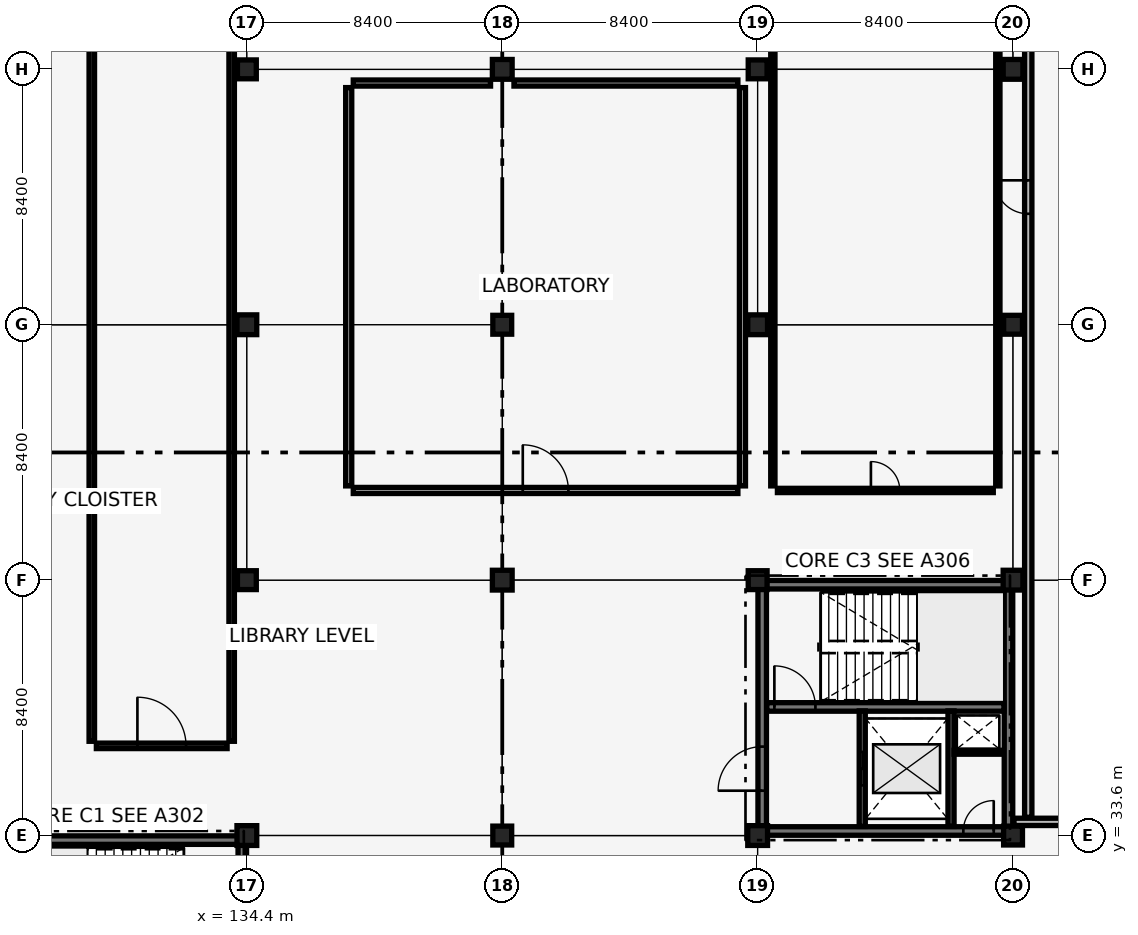
"""IFC4 building model, lengths in metres.
Left out: names, types, materials, properties, quantities, classifications, styles, units other than length and angle.
Written with IfcOpenShell. Run it as: python <this file> out.ifc"""

import sys

from ifc_helpers import new_model, si_unit, direction, frame, frame_2d, origin, origin_2d, place, context, subcontext, project, spatial, rectangle, extrude, element, fill, save


model = new_model("IFC4")
c1 = context("Model", 3, precision=1e-05, world=origin(), true_north=direction((0.0, 1.0)))
c2 = subcontext(c1, "Body", "Model", "MODEL_VIEW")
j1 = project(units=[si_unit("LENGTHUNIT", "METRE"), si_unit("PLANEANGLEUNIT", "RADIAN")], contexts=[c1])
p1 = place(None, origin())
s1 = spatial("IfcSite", under=j1, at=p1, CompositionType="ELEMENT")
p2 = place(p1, origin())
s2 = spatial("IfcBuilding", under=s1, at=p2, CompositionType="ELEMENT")
p3 = place(p2, frame((0.0, 0.0, 13.94)))
s3 = spatial("IfcBuildingStorey", under=s2, at=p3, CompositionType="ELEMENT", Elevation=13.94)
p4 = place(p3, frame((126.15, 33.45, 0.0), z_axis=(0.0, 0.0, 1.0), x_axis=(1.0, 0.0, 0.0)))
e1 = element("IfcWall", 1, at=p4, inside=s3, PredefinedType="SHEAR", context=c2, shape_type="SweptSolid", body=[
    extrude(rectangle(XDim=8.1, YDim=0.28, at=frame_2d((4.05, 0.0))), origin(), (0.0, 0.0, 1.0), 3.78),
])
p5 = place(p3, frame((134.25, 25.35, 0.0), z_axis=(0.0, 0.0, 1.0), x_axis=(0.0, 1.0, 0.0)))
e2 = element("IfcWall", 2, at=p5, inside=s3, PredefinedType="SHEAR", context=c2, shape_type="SweptSolid", body=[
    extrude(rectangle(XDim=8.1, YDim=0.28, at=frame_2d((4.05, 0.0))), origin(), (0.0, 0.0, 1.0), 3.78),
])
p6 = place(p5, frame((1.325, 0.0, 0.0)))
e3 = element("IfcOpeningElement", 3, at=p6, cuts=e2, PredefinedType="OPENING", context=c2, shape_type="SweptSolid", body=[
    extrude(rectangle(XDim=1.45, YDim=2.15, at=frame_2d((0.725, 1.075))), frame((0.0, 0.15, 0.0), z_axis=(0.0, -1.0, 0.0), x_axis=(1.0, 0.0, 0.0)), (0.0, 0.0, 1.0), 0.3),
])
p7 = place(p3, frame((151.35, 33.75, 0.0), z_axis=(0.0, 0.0, 1.0), x_axis=(1.0, 0.0, 0.0)))
e4 = element("IfcWall", 4, at=p7, inside=s3, PredefinedType="SHEAR", context=c2, shape_type="SweptSolid", body=[
    extrude(rectangle(XDim=8.1, YDim=0.28, at=frame_2d((4.05, 0.0))), origin(), (0.0, 0.0, 1.0), 3.78),
])
p8 = place(p7, frame((6.615, 0.0, 0.0)))
e5 = element("IfcOpeningElement", 5, at=p8, cuts=e4, PredefinedType="OPENING", context=c2, shape_type="SweptSolid", body=[
    extrude(rectangle(XDim=1.0, YDim=2.15, at=frame_2d((0.5, 1.075))), frame((0.0, 0.15, 0.0), z_axis=(0.0, -1.0, 0.0), x_axis=(1.0, 0.0, 0.0)), (0.0, 0.0, 1.0), 0.3),
])
p9 = place(p3, frame((151.35, 41.85, 0.0), z_axis=(0.0, 0.0, 1.0), x_axis=(1.0, 0.0, 0.0)))
e6 = element("IfcWall", 6, at=p9, inside=s3, PredefinedType="SHEAR", context=c2, shape_type="SweptSolid", body=[
    extrude(rectangle(XDim=8.1, YDim=0.28, at=frame_2d((4.05, 0.0))), origin(), (0.0, 0.0, 1.0), 3.78),
])
p10 = place(p3, frame((151.35, 33.75, 0.0), z_axis=(0.0, 0.0, 1.0), x_axis=(0.0, 1.0, 0.0)))
e7 = element("IfcWall", 7, at=p10, inside=s3, PredefinedType="SHEAR", context=c2, shape_type="SweptSolid", body=[
    extrude(rectangle(XDim=8.1, YDim=0.28, at=frame_2d((4.05, 0.0))), origin(), (0.0, 0.0, 1.0), 3.78),
])
p11 = place(p10, frame((1.325, 0.0, 0.0)))
e8 = element("IfcOpeningElement", 8, at=p11, cuts=e7, PredefinedType="OPENING", context=c2, shape_type="SweptSolid", body=[
    extrude(rectangle(XDim=1.45, YDim=2.15, at=frame_2d((0.725, 1.075))), frame((0.0, 0.15, 0.0), z_axis=(0.0, -1.0, 0.0), x_axis=(1.0, 0.0, 0.0)), (0.0, 0.0, 1.0), 0.3),
])
p12 = place(p3, frame((159.45, 33.75, 0.0), z_axis=(0.0, 0.0, 1.0), x_axis=(0.0, 1.0, 0.0)))
e9 = element("IfcWall", 9, at=p12, inside=s3, PredefinedType="SHEAR", context=c2, shape_type="SweptSolid", body=[
    extrude(rectangle(XDim=8.1, YDim=0.28, at=frame_2d((4.05, 0.0))), origin(), (0.0, 0.0, 1.0), 3.78),
])
p13 = place(p3, frame((151.5, 37.83, 0.0), z_axis=(0.0, 0.0, 1.0), x_axis=(1.0, 0.0, 0.0)))
e10 = element("IfcWall", 10, at=p13, inside=s3, PredefinedType="SHEAR", context=c2, shape_type="SweptSolid", body=[
    extrude(rectangle(XDim=7.8, YDim=0.28, at=frame_2d((3.9, 0.0))), origin(), (0.0, 0.0, 1.0), 3.78),
])
p14 = place(p13, frame((0.25, 0.0, 0.0)))
e11 = element("IfcOpeningElement", 11, at=p14, cuts=e10, PredefinedType="OPENING", context=c2, shape_type="SweptSolid", body=[
    extrude(rectangle(XDim=1.35, YDim=2.15, at=frame_2d((0.675, 1.075))), frame((0.0, 0.15, 0.0), z_axis=(0.0, -1.0, 0.0), x_axis=(1.0, 0.0, 0.0)), (0.0, 0.0, 1.0), 0.3),
])
p15 = place(p3, frame((134.4, 33.6, 0.0), z_axis=(0.0, 0.0, 1.0), x_axis=(1.0, 0.0, 0.0)))
e12 = element("IfcColumn", 12, at=p15, inside=s3, PredefinedType="COLUMN", context=c2, shape_type="SweptSolid", body=[
    extrude(rectangle(XDim=0.65, YDim=0.65, at=origin_2d()), origin(), (0.0, 0.0, 1.0), 3.78),
])
p16 = place(p3, frame((134.4, 42.0, 0.0), z_axis=(0.0, 0.0, 1.0), x_axis=(1.0, 0.0, 0.0)))
e13 = element("IfcColumn", 13, at=p16, inside=s3, PredefinedType="COLUMN", context=c2, shape_type="SweptSolid", body=[
    extrude(rectangle(XDim=0.62, YDim=0.62, at=origin_2d()), origin(), (0.0, 0.0, 1.0), 3.78),
])
p17 = place(p3, frame((134.4, 50.4, 0.0), z_axis=(0.0, 0.0, 1.0), x_axis=(1.0, 0.0, 0.0)))
e14 = element("IfcColumn", 14, at=p17, inside=s3, PredefinedType="COLUMN", context=c2, shape_type="SweptSolid", body=[
    extrude(rectangle(XDim=0.65, YDim=0.65, at=origin_2d()), origin(), (0.0, 0.0, 1.0), 3.78),
])
for number, where, z_axis, x_axis in (
    (15, (134.4, 58.8, 0.0), (0.0, 0.0, 1.0), (1.0, 0.0, 0.0)),
    (16, (142.8, 33.6, 0.0), (0.0, 0.0, 1.0), (1.0, 0.0, 0.0)),
):
    element("IfcColumn", number, at=place(p3, frame(where, z_axis=z_axis, x_axis=x_axis)), inside=s3, PredefinedType="COLUMN", context=c2, shape_type="SweptSolid", body=[
        extrude(rectangle(XDim=0.62, YDim=0.62, at=origin_2d()), origin(), (0.0, 0.0, 1.0), 3.78),
    ])
p18 = place(p3, frame((142.8, 42.0, 0.0), z_axis=(0.0, 0.0, 1.0), x_axis=(1.0, 0.0, 0.0)))
e17 = element("IfcColumn", 17, at=p18, inside=s3, PredefinedType="COLUMN", context=c2, shape_type="SweptSolid", body=[
    extrude(rectangle(XDim=0.65, YDim=0.65, at=origin_2d()), origin(), (0.0, 0.0, 1.0), 3.78),
])
p19 = place(p3, frame((142.8, 50.4, 0.0), z_axis=(0.0, 0.0, 1.0), x_axis=(1.0, 0.0, 0.0)))
e18 = element("IfcColumn", 18, at=p19, inside=s3, PredefinedType="COLUMN", context=c2, shape_type="SweptSolid", body=[
    extrude(rectangle(XDim=0.62, YDim=0.62, at=origin_2d()), origin(), (0.0, 0.0, 1.0), 3.78),
])
for number, where, z_axis, x_axis in (
    (19, (142.8, 58.8, 0.0), (0.0, 0.0, 1.0), (1.0, 0.0, 0.0)),
    (20, (151.2, 33.6, 0.0), (0.0, 0.0, 1.0), (1.0, 0.0, 0.0)),
):
    element("IfcColumn", number, at=place(p3, frame(where, z_axis=z_axis, x_axis=x_axis)), inside=s3, PredefinedType="COLUMN", context=c2, shape_type="SweptSolid", body=[
        extrude(rectangle(XDim=0.65, YDim=0.65, at=origin_2d()), origin(), (0.0, 0.0, 1.0), 3.78),
    ])
p20 = place(p3, frame((151.2, 42.0, 0.0), z_axis=(0.0, 0.0, 1.0), x_axis=(1.0, 0.0, 0.0)))
e21 = element("IfcColumn", 21, at=p20, inside=s3, PredefinedType="COLUMN", context=c2, shape_type="SweptSolid", body=[
    extrude(rectangle(XDim=0.62, YDim=0.62, at=origin_2d()), origin(), (0.0, 0.0, 1.0), 3.78),
])
p21 = place(p3, frame((151.2, 50.4, 0.0), z_axis=(0.0, 0.0, 1.0), x_axis=(1.0, 0.0, 0.0)))
e22 = element("IfcColumn", 22, at=p21, inside=s3, PredefinedType="COLUMN", context=c2, shape_type="SweptSolid", body=[
    extrude(rectangle(XDim=0.65, YDim=0.65, at=origin_2d()), origin(), (0.0, 0.0, 1.0), 3.78),
])
for number, where, z_axis, x_axis in (
    (23, (151.2, 58.8, 0.0), (0.0, 0.0, 1.0), (1.0, 0.0, 0.0)),
    (24, (159.6, 33.6, 0.0), (0.0, 0.0, 1.0), (1.0, 0.0, 0.0)),
):
    element("IfcColumn", number, at=place(p3, frame(where, z_axis=z_axis, x_axis=x_axis)), inside=s3, PredefinedType="COLUMN", context=c2, shape_type="SweptSolid", body=[
        extrude(rectangle(XDim=0.62, YDim=0.62, at=origin_2d()), origin(), (0.0, 0.0, 1.0), 3.78),
    ])
p22 = place(p3, frame((159.6, 42.0, 0.0), z_axis=(0.0, 0.0, 1.0), x_axis=(1.0, 0.0, 0.0)))
e25 = element("IfcColumn", 25, at=p22, inside=s3, PredefinedType="COLUMN", context=c2, shape_type="SweptSolid", body=[
    extrude(rectangle(XDim=0.65, YDim=0.65, at=origin_2d()), origin(), (0.0, 0.0, 1.0), 3.78),
])
p23 = place(p3, frame((159.6, 50.4, 0.0), z_axis=(0.0, 0.0, 1.0), x_axis=(1.0, 0.0, 0.0)))
e26 = element("IfcColumn", 26, at=p23, inside=s3, PredefinedType="COLUMN", context=c2, shape_type="SweptSolid", body=[
    extrude(rectangle(XDim=0.62, YDim=0.62, at=origin_2d()), origin(), (0.0, 0.0, 1.0), 3.78),
])
p24 = place(p3, frame((159.6, 58.8, 0.0), z_axis=(0.0, 0.0, 1.0), x_axis=(1.0, 0.0, 0.0)))
e27 = element("IfcColumn", 27, at=p24, inside=s3, PredefinedType="COLUMN", context=c2, shape_type="SweptSolid", body=[
    extrude(rectangle(XDim=0.65, YDim=0.65, at=origin_2d()), origin(), (0.0, 0.0, 1.0), 3.78),
])
p25 = place(p3, frame((154.64, 33.9, 0.0), z_axis=(0.0, 0.0, 1.0), x_axis=(0.0, 1.0, 0.0)))
e28 = element("IfcWall", 28, at=p25, inside=s3, PredefinedType="SHEAR", context=c2, shape_type="SweptSolid", body=[
    extrude(rectangle(XDim=3.8, YDim=0.2, at=frame_2d((1.9, 0.0))), origin(), (0.0, 0.0, 1.0), 3.05),
])
p26 = place(p25, frame((1.35, 0.0, 0.0)))
e29 = element("IfcOpeningElement", 29, at=p26, cuts=e28, PredefinedType="OPENING", context=c2, shape_type="SweptSolid", body=[
    extrude(rectangle(XDim=1.1, YDim=2.15, at=frame_2d((0.55, 1.075))), frame((0.0, 0.11, 0.0), z_axis=(0.0, -1.0, 0.0), x_axis=(1.0, 0.0, 0.0)), (0.0, 0.0, 1.0), 0.22),
])
p27 = place(p3, frame((157.56, 33.9, 0.0), z_axis=(0.0, 0.0, 1.0), x_axis=(0.0, 1.0, 0.0)))
e30 = element("IfcWall", 30, at=p27, inside=s3, PredefinedType="SHEAR", context=c2, shape_type="SweptSolid", body=[
    extrude(rectangle(XDim=3.8, YDim=0.2, at=frame_2d((1.9, 0.0))), origin(), (0.0, 0.0, 1.0), 3.05),
])
p28 = place(p3, frame((157.66, 36.34, 0.0), z_axis=(0.0, 0.0, 1.0), x_axis=(1.0, 0.0, 0.0)))
e31 = element("IfcWall", 31, at=p28, inside=s3, PredefinedType="PARTITIONING", context=c2, shape_type="SweptSolid", body=[
    extrude(rectangle(XDim=1.62, YDim=0.13, at=frame_2d((0.81, 0.0))), origin(), (0.0, 0.0, 1.0), 3.78),
])
p29 = place(p3, frame((160.1, 34.2, 0.0), z_axis=(0.0, 0.0, 1.0), x_axis=(0.0, 1.0, 0.0)))
e32 = element("IfcWall", 32, at=p29, inside=s3, PredefinedType="PARTITIONING", context=c2, shape_type="SweptSolid", body=[
    extrude(rectangle(XDim=40.8, YDim=0.24, at=frame_2d((20.4, 0.0))), origin(), (0.0, 0.0, 1.0), 3.05),
])
p30 = place(p29, frame((19.85, 0.0, 0.0)))
e33 = element("IfcOpeningElement", 33, at=p30, cuts=e32, PredefinedType="OPENING", context=c2, shape_type="SweptSolid", body=[
    extrude(rectangle(XDim=1.1, YDim=2.15, at=frame_2d((0.55, 1.075))), frame((0.0, 0.13, 0.0), z_axis=(0.0, -1.0, 0.0), x_axis=(1.0, 0.0, 0.0)), (0.0, 0.0, 1.0), 0.26),
])
p31 = place(p3, frame((159.63, 34.05, 0.0), z_axis=(0.0, 0.0, 1.0), x_axis=(1.0, 0.0, 0.0)))
e34 = element("IfcWall", 34, at=p31, inside=s3, PredefinedType="PARTITIONING", context=c2, shape_type="SweptSolid", body=[
    extrude(rectangle(XDim=8.09, YDim=0.24, at=frame_2d((4.045, 0.0))), origin(), (0.0, 0.0, 1.0), 3.15),
])
p32 = place(p3, frame((129.45, 36.55, 0.0), z_axis=(0.0, 0.0, 1.0), x_axis=(1.0, 0.0, 0.0)))
e35 = element("IfcWall", 35, at=p32, inside=s3, PredefinedType="PARTITIONING", context=c2, shape_type="SweptSolid", body=[
    extrude(rectangle(XDim=4.3, YDim=0.18, at=frame_2d((2.15, 0.0))), origin(), (0.0, 0.0, 1.0), 3.78),
])
p33 = place(p32, frame((1.35, 0.0, 0.0)))
e36 = element("IfcOpeningElement", 36, at=p33, cuts=e35, PredefinedType="OPENING", context=c2, shape_type="SweptSolid", body=[
    extrude(rectangle(XDim=1.6, YDim=2.25, at=frame_2d((0.8, 1.125))), frame((0.0, 0.1, 0.0), z_axis=(0.0, -1.0, 0.0), x_axis=(1.0, 0.0, 0.0)), (0.0, 0.0, 1.0), 0.2),
])
for number, where, z_axis, x_axis in (
    (37, (129.3, 36.7, 0.0), (0.0, 0.0, 1.0), (0.0, 1.0, 0.0)),
    (38, (133.9, 36.7, 0.0), (0.0, 0.0, 1.0), (0.0, 1.0, 0.0)),
):
    element("IfcWall", number, at=place(p3, frame(where, z_axis=z_axis, x_axis=x_axis)), inside=s3, PredefinedType="PARTITIONING", context=c2, shape_type="SweptSolid", body=[
        extrude(rectangle(XDim=47.27, YDim=0.18, at=frame_2d((23.635, 0.0))), origin(), (0.0, 0.0, 1.0), 3.05),
    ])
p34 = place(p3, frame((137.9, 44.95, 0.0), z_axis=(0.0, 0.0, 1.0), x_axis=(1.0, 0.0, 0.0)))
e39 = element("IfcWall", 39, at=p34, inside=s3, PredefinedType="PARTITIONING", context=c2, shape_type="SweptSolid", body=[
    extrude(rectangle(XDim=12.65, YDim=0.2, at=frame_2d((6.325, 0.0))), origin(), (0.0, 0.0, 1.0), 3.35),
])
p35 = place(p34, frame((5.575, 0.0, 0.0)))
e40 = element("IfcOpeningElement", 40, at=p35, cuts=e39, PredefinedType="OPENING", context=c2, shape_type="SweptSolid", body=[
    extrude(rectangle(XDim=1.5, YDim=2.2, at=frame_2d((0.75, 1.1))), frame((0.0, 0.11, 0.0), z_axis=(0.0, -1.0, 0.0), x_axis=(1.0, 0.0, 0.0)), (0.0, 0.0, 1.0), 0.22),
])
p36 = place(p3, frame((137.75, 45.1, 0.0), z_axis=(0.0, 0.0, 1.0), x_axis=(0.0, 1.0, 0.0)))
e41 = element("IfcWall", 41, at=p36, inside=s3, PredefinedType="PARTITIONING", context=c2, shape_type="SweptSolid", body=[
    extrude(rectangle(XDim=13.1, YDim=0.2, at=frame_2d((6.55, 0.0))), origin(), (0.0, 0.0, 1.0), 3.05),
])
p37 = place(p3, frame((137.9, 58.35, 0.0), z_axis=(0.0, 0.0, 1.0), x_axis=(1.0, 0.0, 0.0)))
e42 = element("IfcWall", 42, at=p37, inside=s3, PredefinedType="PARTITIONING", context=c2, shape_type="SweptSolid", body=[
    extrude(rectangle(XDim=4.515, YDim=0.2, at=frame_2d((2.258, 0.0))), origin(), (0.0, 0.0, 1.0), 3.78),
])
p38 = place(p3, frame((143.185, 58.35, 0.0), z_axis=(0.0, 0.0, 1.0), x_axis=(1.0, 0.0, 0.0)))
e43 = element("IfcWall", 43, at=p38, inside=s3, PredefinedType="PARTITIONING", context=c2, shape_type="SweptSolid", body=[
    extrude(rectangle(XDim=7.365, YDim=0.2, at=frame_2d((3.683, 0.0))), origin(), (0.0, 0.0, 1.0), 3.78),
])
p39 = place(p3, frame((150.7, 45.1, 0.0), z_axis=(0.0, 0.0, 1.0), x_axis=(0.0, 1.0, 0.0)))
e44 = element("IfcWall", 44, at=p39, inside=s3, PredefinedType="PARTITIONING", context=c2, shape_type="SweptSolid", body=[
    extrude(rectangle(XDim=13.1, YDim=0.2, at=frame_2d((6.55, 0.0))), origin(), (0.0, 0.0, 1.0), 3.05),
])
p40 = place(p3, frame((151.85, 44.95, 0.0), z_axis=(0.0, 0.0, 1.0), x_axis=(1.0, 0.0, 0.0)))
e45 = element("IfcWall", 45, at=p40, inside=s3, PredefinedType="PARTITIONING", context=c2, shape_type="SweptSolid", body=[
    extrude(rectangle(XDim=7.1, YDim=0.14, at=frame_2d((3.55, 0.0))), origin(), (0.0, 0.0, 1.0), 3.78),
])
p41 = place(p40, frame((3.075, 0.0, 0.0)))
e46 = element("IfcOpeningElement", 46, at=p41, cuts=e45, PredefinedType="OPENING", context=c2, shape_type="SweptSolid", body=[
    extrude(rectangle(XDim=0.95, YDim=2.1, at=frame_2d((0.475, 1.05))), frame((0.0, 0.08, 0.0), z_axis=(0.0, -1.0, 0.0), x_axis=(1.0, 0.0, 0.0)), (0.0, 0.0, 1.0), 0.16),
])
for number, where, z_axis, x_axis in (
    (47, (151.7, 45.1, 0.0), (0.0, 0.0, 1.0), (0.0, 1.0, 0.0)),
    (48, (159.1, 45.1, 0.0), (0.0, 0.0, 1.0), (0.0, 1.0, 0.0)),
):
    element("IfcWall", number, at=place(p3, frame(where, z_axis=z_axis, x_axis=x_axis)), inside=s3, PredefinedType="PARTITIONING", context=c2, shape_type="SweptSolid", body=[
        extrude(rectangle(XDim=30.47, YDim=0.14, at=frame_2d((15.235, 0.0))), origin(), (0.0, 0.0, 1.0), 3.05),
    ])
p42 = place(p14, origin())
e49 = element("IfcDoor", 49, at=p42, inside=s3, OperationType="SINGLE_SWING_LEFT", PredefinedType="DOOR", context=c2, shape_type="SweptSolid", body=[
    extrude(rectangle(XDim=1.35, YDim=2.15, at=frame_2d((0.675, 1.075))), frame((0.0, 0.025, 0.0), z_axis=(0.0, -1.0, 0.0), x_axis=(1.0, 0.0, 0.0)), (0.0, 0.0, 1.0), 0.05),
])
fill(e11, e49)
p43 = place(p26, origin())
e50 = element("IfcDoor", 50, at=p43, inside=s3, OperationType="SLIDING_TO_LEFT", PredefinedType="DOOR", context=c2, shape_type="SweptSolid", body=[
    extrude(rectangle(XDim=1.1, YDim=2.15, at=frame_2d((0.55, 1.075))), frame((0.0, 0.025, 0.0), z_axis=(0.0, -1.0, 0.0), x_axis=(1.0, 0.0, 0.0)), (0.0, 0.0, 1.0), 0.05),
])
fill(e29, e50)
p44 = place(p11, origin())
e51 = element("IfcDoor", 51, at=p44, inside=s3, OperationType="DOUBLE_DOOR_SINGLE_SWING", PredefinedType="DOOR", context=c2, shape_type="SweptSolid", body=[
    extrude(rectangle(XDim=1.45, YDim=2.15, at=frame_2d((0.725, 1.075))), frame((0.0, 0.025, 0.0), z_axis=(0.0, -1.0, 0.0), x_axis=(1.0, 0.0, 0.0)), (0.0, 0.0, 1.0), 0.05),
])
fill(e8, e51)
p45 = place(p8, origin())
e52 = element("IfcDoor", 52, at=p45, inside=s3, OperationType="SINGLE_SWING_RIGHT", PredefinedType="DOOR", context=c2, shape_type="SweptSolid", body=[
    extrude(rectangle(XDim=1.0, YDim=2.15, at=frame_2d((0.5, 1.075))), frame((0.0, 0.025, 0.0), z_axis=(0.0, -1.0, 0.0), x_axis=(1.0, 0.0, 0.0)), (0.0, 0.0, 1.0), 0.05),
])
fill(e5, e52)
p46 = place(p30, origin())
e53 = element("IfcDoor", 53, at=p46, inside=s3, OperationType="SINGLE_SWING_RIGHT", PredefinedType="DOOR", context=c2, shape_type="SweptSolid", body=[
    extrude(rectangle(XDim=1.1, YDim=2.15, at=frame_2d((0.55, 1.075))), frame((0.0, 0.025, 0.0), z_axis=(0.0, -1.0, 0.0), x_axis=(1.0, 0.0, 0.0)), (0.0, 0.0, 1.0), 0.05),
])
fill(e33, e53)
p47 = place(p33, origin())
e54 = element("IfcDoor", 54, at=p47, inside=s3, OperationType="DOUBLE_DOOR_SINGLE_SWING", PredefinedType="DOOR", context=c2, shape_type="SweptSolid", body=[
    extrude(rectangle(XDim=1.6, YDim=2.25, at=frame_2d((0.8, 1.125))), frame((0.0, 0.025, 0.0), z_axis=(0.0, -1.0, 0.0), x_axis=(1.0, 0.0, 0.0)), (0.0, 0.0, 1.0), 0.05),
])
fill(e36, e54)
p48 = place(p35, origin())
e55 = element("IfcDoor", 55, at=p48, inside=s3, OperationType="DOUBLE_DOOR_SINGLE_SWING", PredefinedType="DOOR", context=c2, shape_type="SweptSolid", body=[
    extrude(rectangle(XDim=1.5, YDim=2.2, at=frame_2d((0.75, 1.1))), frame((0.0, 0.025, 0.0), z_axis=(0.0, -1.0, 0.0), x_axis=(1.0, 0.0, 0.0)), (0.0, 0.0, 1.0), 0.05),
])
fill(e40, e55)
p49 = place(p41, origin())
e56 = element("IfcDoor", 56, at=p49, inside=s3, OperationType="SINGLE_SWING_LEFT", PredefinedType="DOOR", context=c2, shape_type="SweptSolid", body=[
    extrude(rectangle(XDim=0.95, YDim=2.1, at=frame_2d((0.475, 1.05))), frame((0.0, 0.025, 0.0), z_axis=(0.0, -1.0, 0.0), x_axis=(1.0, 0.0, 0.0)), (0.0, 0.0, 1.0), 0.05),
])
fill(e46, e56)
save(model, sys.argv[1])
